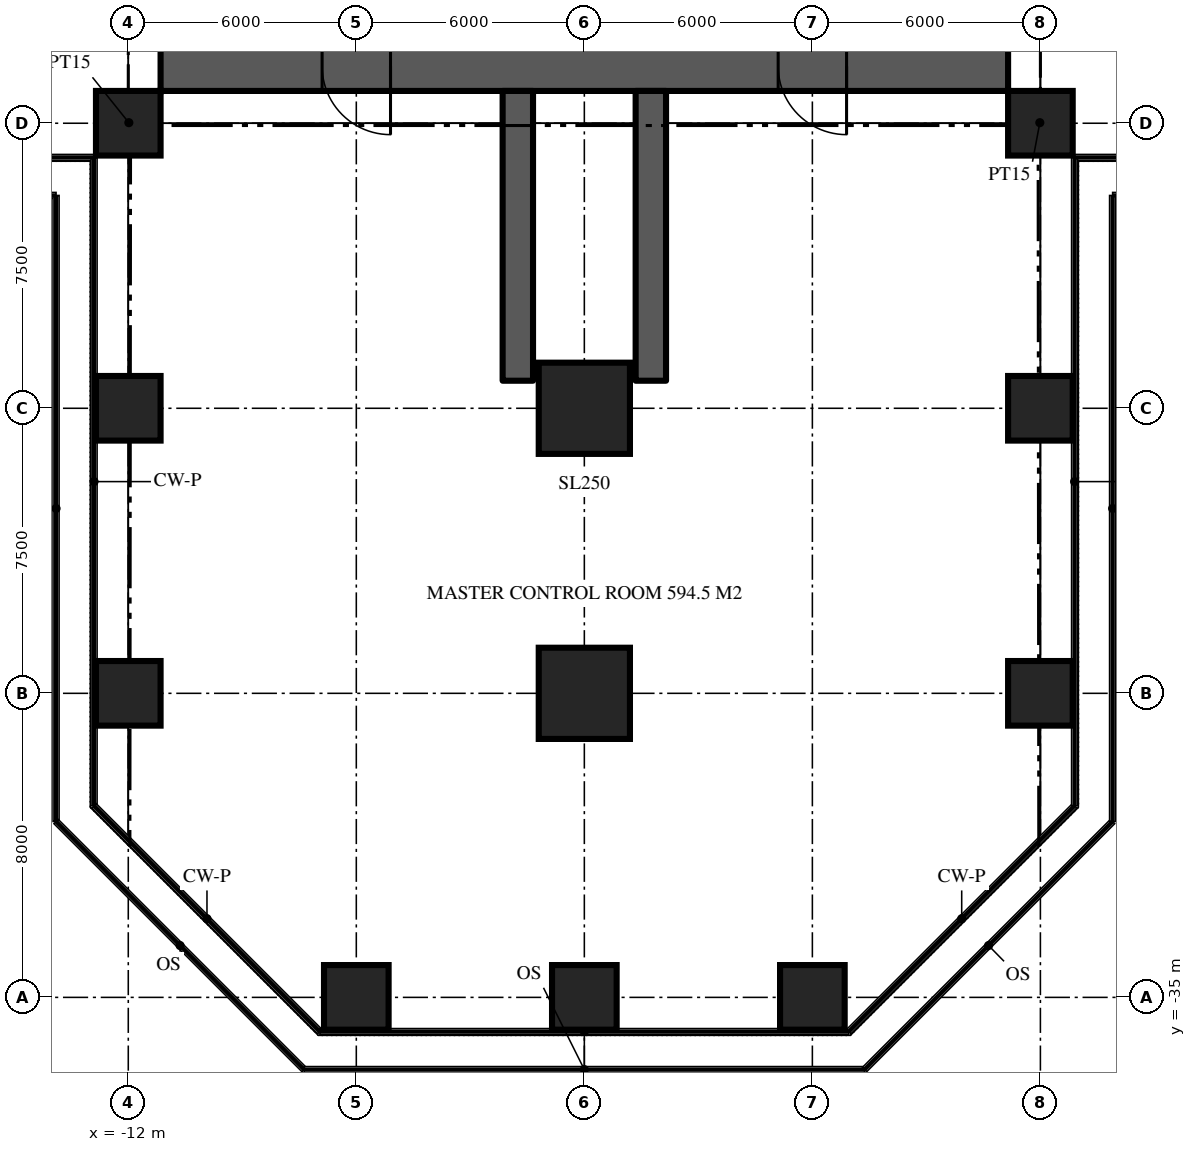
"""IFC4 building model, lengths in metres.
Left out: names, types, materials, properties, quantities, classifications, styles, units other than length and angle.
Written with IfcOpenShell. Run it as: python <this file> out.ifc"""

import sys

from ifc_helpers import new_model, si_unit, direction, frame, frame_2d, origin, origin_2d, place, context, subcontext, project, spatial, rectangle, extrude, element, fill, save


model = new_model("IFC4")
c1 = context("Model", 3, precision=1e-05, world=origin(), true_north=direction((0.0, 1.0)))
c2 = subcontext(c1, "Body", "Model", "MODEL_VIEW")
j1 = project(units=[si_unit("LENGTHUNIT", "METRE"), si_unit("PLANEANGLEUNIT", "RADIAN")], contexts=[c1])
p1 = place(None, origin())
s1 = spatial("IfcSite", under=j1, at=p1, CompositionType="ELEMENT")
p2 = place(p1, origin())
s2 = spatial("IfcBuilding", under=s1, at=p2, CompositionType="ELEMENT")
p3 = place(p2, frame((0.0, 0.0, 23.0)))
s3 = spatial("IfcBuildingStorey", under=s2, at=p3, CompositionType="ELEMENT", Elevation=23.0)
p4 = place(p3, frame((11.15, -10.5, 0.0), z_axis=(0.0, 0.0, 1.0), x_axis=(-1.0, 0.0, 0.0)))
e1 = element("IfcWall", 1, at=p4, inside=s3, PredefinedType="SHEAR", context=c2, shape_type="SweptSolid", body=[
    extrude(rectangle(XDim=22.3, YDim=1.3, at=frame_2d((11.15, 0.0))), origin(), (0.0, 0.0, 1.0), 5.0),
])
p5 = place(p4, frame((16.25, 0.0, 0.0)))
e2 = element("IfcOpeningElement", 2, at=p5, cuts=e1, PredefinedType="OPENING", context=c2, shape_type="SweptSolid", body=[
    extrude(rectangle(XDim=1.8, YDim=2.2, at=frame_2d((0.9, 1.1))), frame((0.0, 0.66, 0.0), z_axis=(0.0, -1.0, 0.0), x_axis=(1.0, 0.0, 0.0)), (0.0, 0.0, 1.0), 1.32),
])
p6 = place(p4, frame((4.25, 0.0, 0.0)))
e3 = element("IfcOpeningElement", 3, at=p6, cuts=e1, PredefinedType="OPENING", context=c2, shape_type="SweptSolid", body=[
    extrude(rectangle(XDim=1.8, YDim=2.2, at=frame_2d((0.9, 1.1))), frame((0.0, 0.66, 0.0), z_axis=(0.0, -1.0, 0.0), x_axis=(1.0, 0.0, 0.0)), (0.0, 0.0, 1.0), 1.32),
])
for number, where, z_axis, x_axis in (
    (4, (-1.75, -11.15, 0.0), (0.0, 0.0, 1.0), (0.0, -1.0, 0.0)),
    (5, (1.75, -11.15, 0.0), (0.0, 0.0, 1.0), (0.0, -1.0, 0.0)),
):
    element("IfcWall", number, at=place(p3, frame(where, z_axis=z_axis, x_axis=x_axis)), inside=s3, PredefinedType="SHEAR", context=c2, shape_type="SweptSolid", body=[
        extrude(rectangle(XDim=7.625, YDim=0.8, at=frame_2d((3.812, 0.0))), origin(), (0.0, 0.0, 1.0), 5.0),
    ])
for number, where, z_axis, x_axis in (
    (6, (-6.0, -35.0, 0.0), (0.0, 0.0, 1.0), (1.0, 0.0, 0.0)),
    (7, (0.0, -35.0, 0.0), (0.0, 0.0, 1.0), (1.0, 0.0, 0.0)),
    (8, (6.0, -35.0, 0.0), (0.0, 0.0, 1.0), (1.0, 0.0, 0.0)),
    (9, (-12.0, -27.0, 0.0), (0.0, 0.0, 1.0), (1.0, 0.0, 0.0)),
):
    element("IfcColumn", number, at=place(p3, frame(where, z_axis=z_axis, x_axis=x_axis)), inside=s3, PredefinedType="COLUMN", context=c2, shape_type="SweptSolid", body=[
        extrude(rectangle(XDim=1.7, YDim=1.7, at=origin_2d()), origin(), (0.0, 0.0, 1.0), 5.0),
    ])
p7 = place(p3, frame((0.0, -27.0, 0.0), z_axis=(0.0, 0.0, 1.0), x_axis=(1.0, 0.0, 0.0)))
e10 = element("IfcColumn", 10, at=p7, inside=s3, PredefinedType="COLUMN", context=c2, shape_type="SweptSolid", body=[
    extrude(rectangle(XDim=2.4, YDim=2.4, at=origin_2d()), origin(), (0.0, 0.0, 1.0), 5.0),
])
for number, where, z_axis, x_axis in (
    (11, (12.0, -27.0, 0.0), (0.0, 0.0, 1.0), (1.0, 0.0, 0.0)),
    (12, (-12.0, -19.5, 0.0), (0.0, 0.0, 1.0), (1.0, 0.0, 0.0)),
):
    element("IfcColumn", number, at=place(p3, frame(where, z_axis=z_axis, x_axis=x_axis)), inside=s3, PredefinedType="COLUMN", context=c2, shape_type="SweptSolid", body=[
        extrude(rectangle(XDim=1.7, YDim=1.7, at=origin_2d()), origin(), (0.0, 0.0, 1.0), 5.0),
    ])
p8 = place(p3, frame((0.0, -19.5, 0.0), z_axis=(0.0, 0.0, 1.0), x_axis=(1.0, 0.0, 0.0)))
e13 = element("IfcColumn", 13, at=p8, inside=s3, PredefinedType="COLUMN", context=c2, shape_type="SweptSolid", body=[
    extrude(rectangle(XDim=2.4, YDim=2.4, at=origin_2d()), origin(), (0.0, 0.0, 1.0), 5.0),
])
for number, where, z_axis, x_axis in (
    (14, (12.0, -19.5, 0.0), (0.0, 0.0, 1.0), (1.0, 0.0, 0.0)),
    (15, (-12.0, -12.0, 0.0), (0.0, 0.0, 1.0), (1.0, 0.0, 0.0)),
    (16, (12.0, -12.0, 0.0), (0.0, 0.0, 1.0), (1.0, 0.0, 0.0)),
):
    element("IfcColumn", number, at=place(p3, frame(where, z_axis=z_axis, x_axis=x_axis)), inside=s3, PredefinedType="COLUMN", context=c2, shape_type="SweptSolid", body=[
        extrude(rectangle(XDim=1.7, YDim=1.7, at=origin_2d()), origin(), (0.0, 0.0, 1.0), 5.0),
    ])
for number, where, z_axis, x_axis in (
    (17, (-11.15, -11.15, 0.0), (0.0, 0.0, 1.0), (-0.707, -0.707, 0.0)),
    (18, (11.15, -11.15, 0.0), (0.0, 0.0, 1.0), (0.707, -0.707, 0.0)),
):
    element("IfcWall", number, at=place(p3, frame(where, z_axis=z_axis, x_axis=x_axis)), inside=s3, PredefinedType="PARTITIONING", context=c2, shape_type="SweptSolid", body=[
        extrude(rectangle(XDim=2.362, YDim=0.15, at=frame_2d((1.181, 0.0))), origin(), (0.0, 0.0, 1.0), 4.75),
    ])
p9 = place(p5, origin())
e19 = element("IfcDoor", 19, at=p9, inside=s3, OperationType="DOUBLE_DOOR_DOUBLE_SWING", PredefinedType="DOOR", context=c2, shape_type="SweptSolid", body=[
    extrude(rectangle(XDim=1.8, YDim=2.2, at=frame_2d((0.9, 1.1))), frame((0.0, 0.025, 0.0), z_axis=(0.0, -1.0, 0.0), x_axis=(1.0, 0.0, 0.0)), (0.0, 0.0, 1.0), 0.05),
])
fill(e2, e19)
p10 = place(p6, origin())
e20 = element("IfcDoor", 20, at=p10, inside=s3, OperationType="DOUBLE_DOOR_DOUBLE_SWING", PredefinedType="DOOR", context=c2, shape_type="SweptSolid", body=[
    extrude(rectangle(XDim=1.8, YDim=2.2, at=frame_2d((0.9, 1.1))), frame((0.0, 0.025, 0.0), z_axis=(0.0, -1.0, 0.0), x_axis=(1.0, 0.0, 0.0)), (0.0, 0.0, 1.0), 0.05),
])
fill(e3, e20)
save(model, sys.argv[1])
